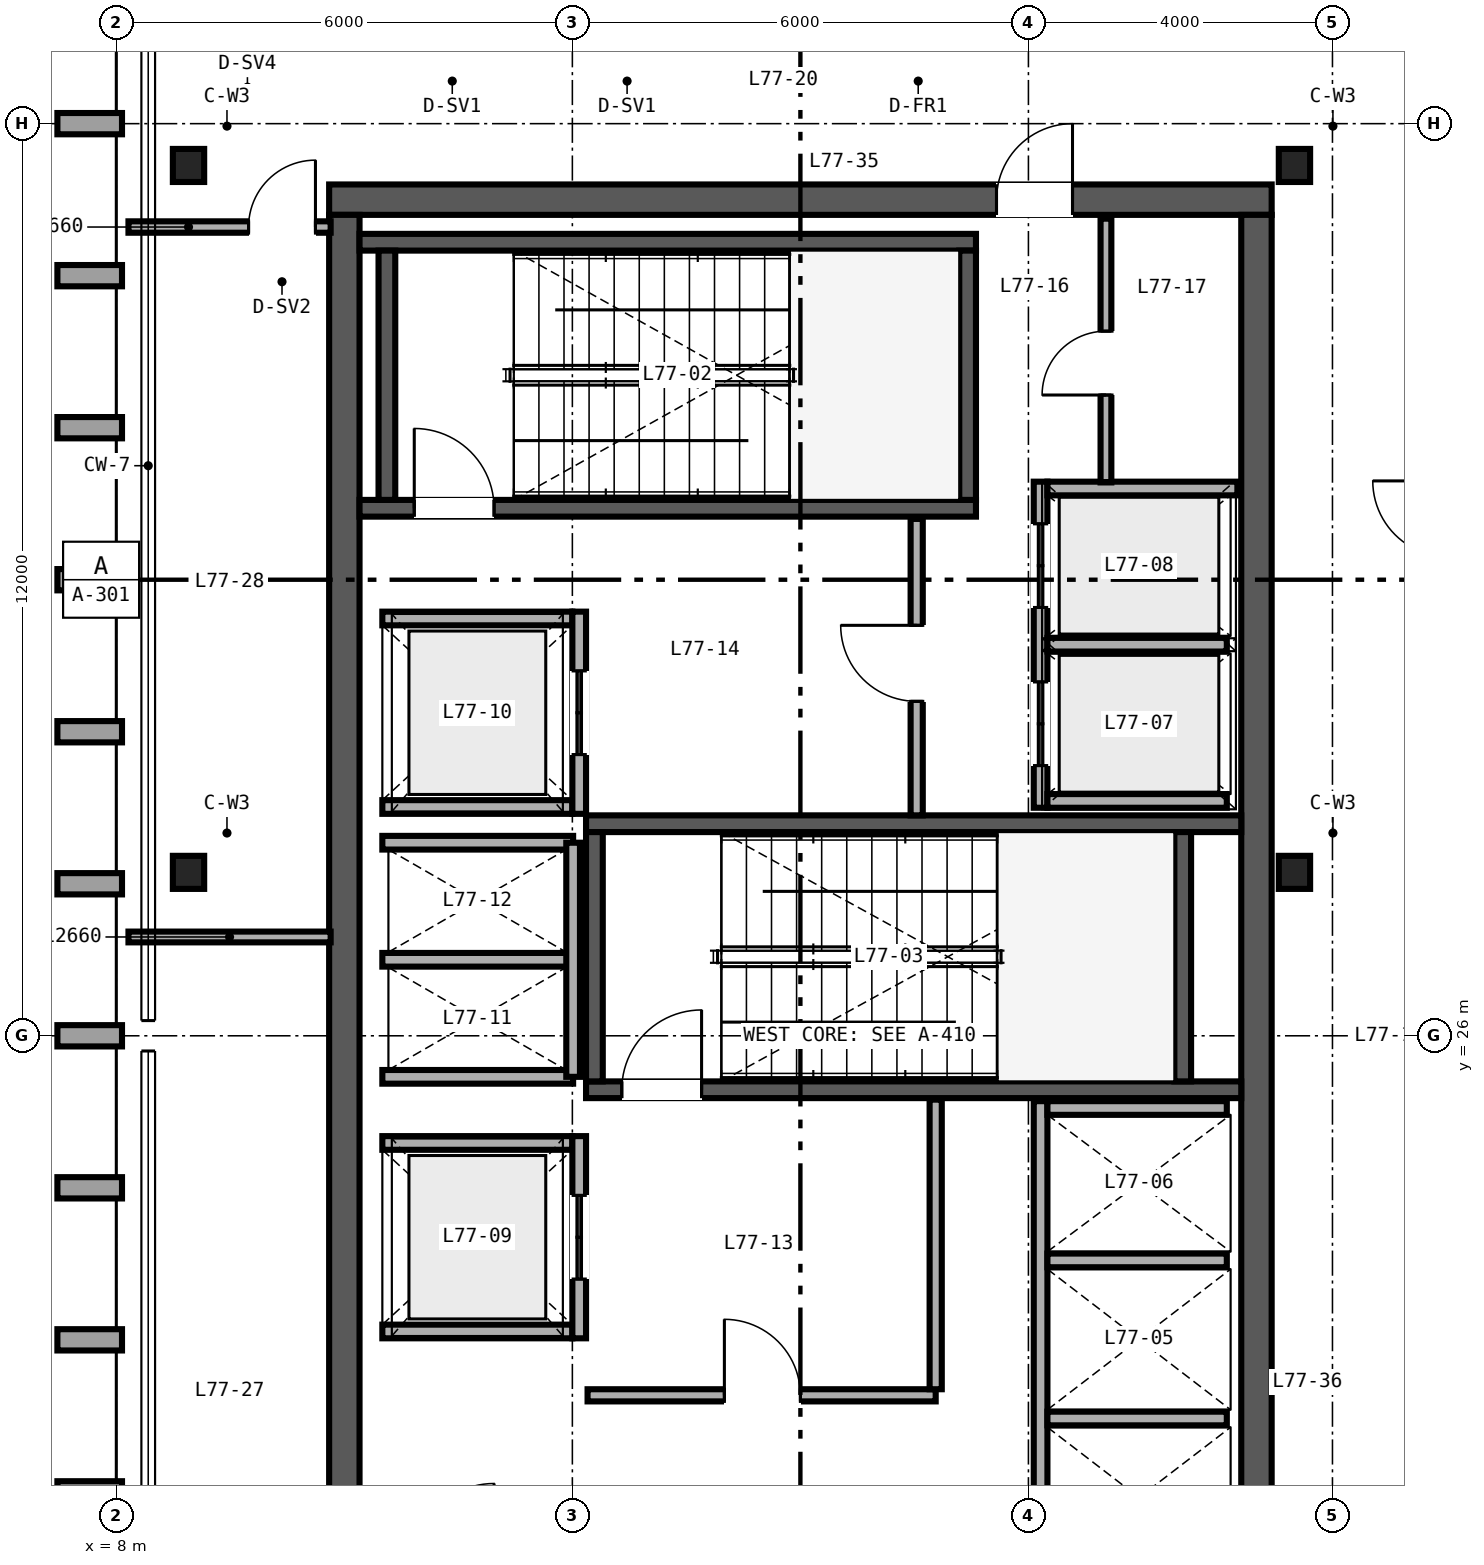
"""IFC4 building model, lengths in metres.
Left out: names, types, materials, properties, quantities, classifications, styles, units other than length and angle.
Written with IfcOpenShell. Run it as: python <this file> out.ifc"""

import sys

from ifc_helpers import new_model, si_unit, direction, frame, frame_2d, origin, origin_2d, place, context, subcontext, project, spatial, rectangle, i_section, extrude, source, transform, mapped, element, fill, save


model = new_model("IFC4")
c1 = context("Model", 3, precision=1e-05, world=origin(), true_north=direction((0.0, 1.0)))
c2 = subcontext(c1, "Body", "Model", "MODEL_VIEW")
j1 = project(units=[si_unit("LENGTHUNIT", "METRE"), si_unit("PLANEANGLEUNIT", "RADIAN")], contexts=[c1])
p1 = place(None, origin())
s1 = spatial("IfcSite", under=j1, at=p1, CompositionType="ELEMENT")
p2 = place(p1, origin())
s2 = spatial("IfcBuilding", under=s1, at=p2, CompositionType="ELEMENT")
p3 = place(p2, frame((0.0, 0.0, 301.2)))
s3 = spatial("IfcBuildingStorey", under=s2, at=p3, CompositionType="ELEMENT", Elevation=301.2)
p4 = place(p3, frame((10.8, 37.0, 0.0), z_axis=(0.0, 0.0, 1.0), x_axis=(1.0, 0.0, 0.0)))
e1 = element("IfcWall", 1, at=p4, inside=s3, PredefinedType="SHEAR", context=c2, shape_type="SweptSolid", body=[
    extrude(rectangle(XDim=12.4, YDim=0.4, at=frame_2d((6.2, 0.0))), origin(), (0.0, 0.0, 1.0), 3.92),
])
p5 = place(p4, frame((8.78, 0.0, 0.0)))
e2 = element("IfcOpeningElement", 2, at=p5, cuts=e1, PredefinedType="OPENING", context=c2, shape_type="SweptSolid", body=[
    extrude(rectangle(XDim=1.0, YDim=2.15, at=frame_2d((0.5, 1.075))), frame((0.0, 0.21, 0.0), z_axis=(0.0, -1.0, 0.0), x_axis=(1.0, 0.0, 0.0)), (0.0, 0.0, 1.0), 0.42),
])
for number, where, z_axis, x_axis in (
    (3, (11.0, 15.2, 0.0), (0.0, 0.0, 1.0), (0.0, 1.0, 0.0)),
    (4, (23.0, 15.2, 0.0), (0.0, 0.0, 1.0), (0.0, 1.0, 0.0)),
):
    element("IfcWall", number, at=place(p3, frame(where, z_axis=z_axis, x_axis=x_axis)), inside=s3, PredefinedType="SHEAR", context=c2, shape_type="SweptSolid", body=[
        extrude(rectangle(XDim=21.6, YDim=0.4, at=frame_2d((10.8, 0.0))), origin(), (0.0, 0.0, 1.0), 3.92),
    ])
p6 = place(p3, frame((11.2, 32.94, 0.0), z_axis=(0.0, 0.0, 1.0), x_axis=(1.0, 0.0, 0.0)))
e5 = element("IfcWall", 5, at=p6, inside=s3, PredefinedType="SHEAR", context=c2, shape_type="SweptSolid", body=[
    extrude(rectangle(XDim=8.11, YDim=0.22, at=frame_2d((4.055, 0.0))), origin(), (0.0, 0.0, 1.0), 4.0),
])
p7 = place(p6, frame((0.72, 0.0, 0.0)))
e6 = element("IfcOpeningElement", 6, at=p7, cuts=e5, PredefinedType="OPENING", context=c2, shape_type="SweptSolid", body=[
    extrude(rectangle(XDim=1.05, YDim=2.15, at=frame_2d((0.525, 1.075))), frame((0.0, 0.12, 0.0), z_axis=(0.0, -1.0, 0.0), x_axis=(1.0, 0.0, 0.0)), (0.0, 0.0, 1.0), 0.24),
])
p8 = place(p3, frame((11.2, 36.44, 0.0), z_axis=(0.0, 0.0, 1.0), x_axis=(1.0, 0.0, 0.0)))
e7 = element("IfcWall", 7, at=p8, inside=s3, PredefinedType="SHEAR", context=c2, shape_type="SweptSolid", body=[
    extrude(rectangle(XDim=8.11, YDim=0.22, at=frame_2d((4.055, 0.0))), origin(), (0.0, 0.0, 1.0), 4.0),
])
for number, where, z_axis, x_axis in (
    (8, (11.56, 33.05, 0.0), (0.0, 0.0, 1.0), (0.0, 1.0, 0.0)),
    (9, (19.2, 33.05, 0.0), (0.0, 0.0, 1.0), (0.0, 1.0, 0.0)),
):
    element("IfcWall", number, at=place(p3, frame(where, z_axis=z_axis, x_axis=x_axis)), inside=s3, PredefinedType="SHEAR", context=c2, shape_type="SweptSolid", body=[
        extrude(rectangle(XDim=3.28, YDim=0.22, at=frame_2d((1.64, 0.0))), origin(), (0.0, 0.0, 1.0), 4.0),
    ])
p9 = place(p3, frame((14.18, 25.29, 0.0), z_axis=(0.0, 0.0, 1.0), x_axis=(1.0, 0.0, 0.0)))
e10 = element("IfcWall", 10, at=p9, inside=s3, PredefinedType="SHEAR", context=c2, shape_type="SweptSolid", body=[
    extrude(rectangle(XDim=8.62, YDim=0.22, at=frame_2d((4.31, 0.0))), origin(), (0.0, 0.0, 1.0), 4.0),
])
p10 = place(p9, frame((0.47, 0.0, 0.0)))
e11 = element("IfcOpeningElement", 11, at=p10, cuts=e10, PredefinedType="OPENING", context=c2, shape_type="SweptSolid", body=[
    extrude(rectangle(XDim=1.05, YDim=2.15, at=frame_2d((0.525, 1.075))), frame((0.0, 0.12, 0.0), z_axis=(0.0, -1.0, 0.0), x_axis=(1.0, 0.0, 0.0)), (0.0, 0.0, 1.0), 0.24),
])
p11 = place(p3, frame((14.18, 28.79, 0.0), z_axis=(0.0, 0.0, 1.0), x_axis=(1.0, 0.0, 0.0)))
e12 = element("IfcWall", 12, at=p11, inside=s3, PredefinedType="SHEAR", context=c2, shape_type="SweptSolid", body=[
    extrude(rectangle(XDim=8.62, YDim=0.22, at=frame_2d((4.31, 0.0))), origin(), (0.0, 0.0, 1.0), 4.0),
])
for number, where, z_axis, x_axis in (
    (13, (14.29, 25.4, 0.0), (0.0, 0.0, 1.0), (0.0, 1.0, 0.0)),
    (14, (22.03, 25.4, 0.0), (0.0, 0.0, 1.0), (0.0, 1.0, 0.0)),
):
    element("IfcWall", number, at=place(p3, frame(where, z_axis=z_axis, x_axis=x_axis)), inside=s3, PredefinedType="SHEAR", context=c2, shape_type="SweptSolid", body=[
        extrude(rectangle(XDim=3.28, YDim=0.22, at=frame_2d((1.64, 0.0))), origin(), (0.0, 0.0, 1.0), 4.0),
    ])
m1 = source(origin(), c2, "Body", "SweptSolid", [
    extrude(i_section(OverallWidth=0.412, OverallDepth=0.435, WebThickness=0.036, FlangeThickness=0.057, FilletRadius=0.025, at=origin_2d()), origin(), (0.0, 0.0, 1.0), 3.92),
])
for number, where, z_axis, x_axis in (
    (15, (8.95, 28.15, 0.0), (0.0, 0.0, 1.0), (1.0, 0.0, 0.0)),
    (16, (23.5, 28.15, 0.0), (0.0, 0.0, 1.0), (1.0, 0.0, 0.0)),
    (17, (8.95, 37.45, 0.0), (0.0, 0.0, 1.0), (1.0, 0.0, 0.0)),
    (18, (23.5, 37.45, 0.0), (0.0, 0.0, 1.0), (1.0, 0.0, 0.0)),
):
    element("IfcColumn", number, at=place(p3, frame(where, z_axis=z_axis, x_axis=x_axis)), inside=s3, PredefinedType="COLUMN", context=c2, shape_type="MappedRepresentation", body=[
        mapped(m1, transform((0.0, 0.0, 0.0), scale=1.0)),
    ])
p12 = place(p3, frame((20.16, 18.82, 0.0), z_axis=(0.0, 0.0, 1.0), x_axis=(0.0, 1.0, 0.0)))
e19 = element("IfcWall", 19, at=p12, inside=s3, PredefinedType="SOLIDWALL", context=c2, shape_type="SweptSolid", body=[
    extrude(rectangle(XDim=6.32, YDim=0.18, at=frame_2d((3.16, 0.0))), origin(), (0.0, 0.0, 1.0), 3.02),
])
p13 = place(p3, frame((20.25, 25.05, 0.0), z_axis=(0.0, 0.0, 1.0), x_axis=(1.0, 0.0, 0.0)))
e20 = element("IfcWall", 20, at=p13, inside=s3, PredefinedType="SOLIDWALL", context=c2, shape_type="SweptSolid", body=[
    extrude(rectangle(XDim=2.36, YDim=0.18, at=frame_2d((1.18, 0.0))), origin(), (0.0, 0.0, 1.0), 3.92),
])
p14 = place(p3, frame((20.25, 20.965, 0.0), z_axis=(0.0, 0.0, 1.0), x_axis=(1.0, 0.0, 0.0)))
e21 = element("IfcWall", 21, at=p14, inside=s3, PredefinedType="SOLIDWALL", context=c2, shape_type="SweptSolid", body=[
    extrude(rectangle(XDim=2.36, YDim=0.18, at=frame_2d((1.18, 0.0))), origin(), (0.0, 0.0, 1.0), 3.02),
])
p15 = place(p3, frame((20.25, 23.045, 0.0), z_axis=(0.0, 0.0, 1.0), x_axis=(1.0, 0.0, 0.0)))
e22 = element("IfcWall", 22, at=p15, inside=s3, PredefinedType="SOLIDWALL", context=c2, shape_type="SweptSolid", body=[
    extrude(rectangle(XDim=2.36, YDim=0.18, at=frame_2d((1.18, 0.0))), origin(), (0.0, 0.0, 1.0), 3.92),
])
p16 = place(p3, frame((20.16, 29.0, 0.0), z_axis=(0.0, 0.0, 1.0), x_axis=(0.0, 1.0, 0.0)))
e23 = element("IfcWall", 23, at=p16, inside=s3, PredefinedType="SOLIDWALL", context=c2, shape_type="SweptSolid", body=[
    extrude(rectangle(XDim=4.29, YDim=0.18, at=frame_2d((2.145, 0.0))), origin(), (0.0, 0.0, 1.0), 3.92),
])
p17 = place(p16, frame((0.555, 0.0, 0.0)))
e24 = element("IfcOpeningElement", 24, at=p17, cuts=e23, PredefinedType="OPENING", context=c2, shape_type="SweptSolid", body=[
    extrude(rectangle(XDim=1.1, YDim=2.2, at=frame_2d((0.55, 1.1))), frame((0.0, 0.1, 0.0), z_axis=(0.0, -1.0, 0.0), x_axis=(1.0, 0.0, 0.0)), (0.0, 0.0, 1.0), 0.2),
])
p18 = place(p16, frame((2.635, 0.0, 0.0)))
e25 = element("IfcOpeningElement", 25, at=p18, cuts=e23, PredefinedType="OPENING", context=c2, shape_type="SweptSolid", body=[
    extrude(rectangle(XDim=1.1, YDim=2.2, at=frame_2d((0.55, 1.1))), frame((0.0, 0.1, 0.0), z_axis=(0.0, -1.0, 0.0), x_axis=(1.0, 0.0, 0.0)), (0.0, 0.0, 1.0), 0.2),
])
p19 = place(p3, frame((20.25, 29.09, 0.0), z_axis=(0.0, 0.0, 1.0), x_axis=(1.0, 0.0, 0.0)))
e26 = element("IfcWall", 26, at=p19, inside=s3, PredefinedType="SOLIDWALL", context=c2, shape_type="SweptSolid", body=[
    extrude(rectangle(XDim=2.36, YDim=0.18, at=frame_2d((1.18, 0.0))), origin(), (0.0, 0.0, 1.0), 3.92),
])
p20 = place(p3, frame((20.25, 33.2, 0.0), z_axis=(0.0, 0.0, 1.0), x_axis=(1.0, 0.0, 0.0)))
e27 = element("IfcWall", 27, at=p20, inside=s3, PredefinedType="SOLIDWALL", context=c2, shape_type="SweptSolid", body=[
    extrude(rectangle(XDim=2.5, YDim=0.18, at=frame_2d((1.25, 0.0))), origin(), (0.0, 0.0, 1.0), 3.92),
])
p21 = place(p3, frame((20.25, 31.145, 0.0), z_axis=(0.0, 0.0, 1.0), x_axis=(1.0, 0.0, 0.0)))
e28 = element("IfcWall", 28, at=p21, inside=s3, PredefinedType="SOLIDWALL", context=c2, shape_type="SweptSolid", body=[
    extrude(rectangle(XDim=2.36, YDim=0.18, at=frame_2d((1.18, 0.0))), origin(), (0.0, 0.0, 1.0), 3.92),
])
for number, where, z_axis, x_axis in (
    (29, (11.5, 22.11, 0.0), (0.0, 0.0, 1.0), (1.0, 0.0, 0.0)),
    (30, (11.5, 24.59, 0.0), (0.0, 0.0, 1.0), (1.0, 0.0, 0.0)),
):
    element("IfcWall", number, at=place(p3, frame(where, z_axis=z_axis, x_axis=x_axis)), inside=s3, PredefinedType="SOLIDWALL", context=c2, shape_type="SweptSolid", body=[
        extrude(rectangle(XDim=2.5, YDim=0.18, at=frame_2d((1.25, 0.0))), origin(), (0.0, 0.0, 1.0), 3.92),
    ])
p22 = place(p3, frame((14.09, 22.02, 0.0), z_axis=(0.0, 0.0, 1.0), x_axis=(0.0, 1.0, 0.0)))
e31 = element("IfcWall", 31, at=p22, inside=s3, PredefinedType="SOLIDWALL", context=c2, shape_type="SweptSolid", body=[
    extrude(rectangle(XDim=2.66, YDim=0.18, at=frame_2d((1.33, 0.0))), origin(), (0.0, 0.0, 1.0), 3.92),
])
p23 = place(p22, frame((0.78, 0.0, 0.0)))
e32 = element("IfcOpeningElement", 32, at=p23, cuts=e31, PredefinedType="OPENING", context=c2, shape_type="SweptSolid", body=[
    extrude(rectangle(XDim=1.1, YDim=2.2, at=frame_2d((0.55, 1.1))), frame((0.0, 0.1, 0.0), z_axis=(0.0, -1.0, 0.0), x_axis=(1.0, 0.0, 0.0)), (0.0, 0.0, 1.0), 0.2),
])
for number, where, z_axis, x_axis in (
    (33, (11.5, 29.01, 0.0), (0.0, 0.0, 1.0), (1.0, 0.0, 0.0)),
    (34, (11.5, 31.49, 0.0), (0.0, 0.0, 1.0), (1.0, 0.0, 0.0)),
):
    element("IfcWall", number, at=place(p3, frame(where, z_axis=z_axis, x_axis=x_axis)), inside=s3, PredefinedType="SOLIDWALL", context=c2, shape_type="SweptSolid", body=[
        extrude(rectangle(XDim=2.5, YDim=0.18, at=frame_2d((1.25, 0.0))), origin(), (0.0, 0.0, 1.0), 3.92),
    ])
p24 = place(p3, frame((14.09, 28.92, 0.0), z_axis=(0.0, 0.0, 1.0), x_axis=(0.0, 1.0, 0.0)))
e35 = element("IfcWall", 35, at=p24, inside=s3, PredefinedType="SOLIDWALL", context=c2, shape_type="SweptSolid", body=[
    extrude(rectangle(XDim=2.66, YDim=0.18, at=frame_2d((1.33, 0.0))), origin(), (0.0, 0.0, 1.0), 3.92),
])
p25 = place(p24, frame((0.78, 0.0, 0.0)))
e36 = element("IfcOpeningElement", 36, at=p25, cuts=e35, PredefinedType="OPENING", context=c2, shape_type="SweptSolid", body=[
    extrude(rectangle(XDim=1.1, YDim=2.2, at=frame_2d((0.55, 1.1))), frame((0.0, 0.1, 0.0), z_axis=(0.0, -1.0, 0.0), x_axis=(1.0, 0.0, 0.0)), (0.0, 0.0, 1.0), 0.2),
])
for number, where, z_axis, x_axis in (
    (37, (11.5, 25.46, 0.0), (0.0, 0.0, 1.0), (1.0, 0.0, 0.0)),
    (38, (11.5, 27.0, 0.0), (0.0, 0.0, 1.0), (1.0, 0.0, 0.0)),
    (39, (11.5, 28.54, 0.0), (0.0, 0.0, 1.0), (1.0, 0.0, 0.0)),
):
    element("IfcWall", number, at=place(p3, frame(where, z_axis=z_axis, x_axis=x_axis)), inside=s3, PredefinedType="SOLIDWALL", context=c2, shape_type="SweptSolid", body=[
        extrude(rectangle(XDim=2.51, YDim=0.18, at=frame_2d((1.255, 0.0))), origin(), (0.0, 0.0, 1.0), 3.92),
    ])
p26 = place(p3, frame((14.01, 25.46, 0.0), z_axis=(0.0, 0.0, 1.0), x_axis=(0.0, 1.0, 0.0)))
e40 = element("IfcWall", 40, at=p26, inside=s3, PredefinedType="SOLIDWALL", context=c2, shape_type="SweptSolid", body=[
    extrude(rectangle(XDim=3.08, YDim=0.18, at=frame_2d((1.54, 0.0))), origin(), (0.0, 0.0, 1.0), 3.92),
])
p27 = place(p3, frame((14.2, 21.27, 0.0), z_axis=(0.0, 0.0, 1.0), x_axis=(1.0, 0.0, 0.0)))
e41 = element("IfcWall", 41, at=p27, inside=s3, PredefinedType="PARTITIONING", context=c2, shape_type="SweptSolid", body=[
    extrude(rectangle(XDim=4.58, YDim=0.16, at=frame_2d((2.29, 0.0))), origin(), (0.0, 0.0, 1.0), 3.92),
])
p28 = place(p27, frame((1.8, 0.0, 0.0)))
e42 = element("IfcOpeningElement", 42, at=p28, cuts=e41, PredefinedType="OPENING", context=c2, shape_type="SweptSolid", body=[
    extrude(rectangle(XDim=1.0, YDim=2.15, at=frame_2d((0.5, 1.075))), frame((0.0, 0.09, 0.0), z_axis=(0.0, -1.0, 0.0), x_axis=(1.0, 0.0, 0.0)), (0.0, 0.0, 1.0), 0.18),
])
p29 = place(p3, frame((18.78, 21.35, 0.0), z_axis=(0.0, 0.0, 1.0), x_axis=(0.0, 1.0, 0.0)))
e43 = element("IfcWall", 43, at=p29, inside=s3, PredefinedType="PARTITIONING", context=c2, shape_type="SweptSolid", body=[
    extrude(rectangle(XDim=3.81, YDim=0.16, at=frame_2d((1.905, 0.0))), origin(), (0.0, 0.0, 1.0), 3.92),
])
p30 = place(p3, frame((18.53, 28.9, 0.0), z_axis=(0.0, 0.0, 1.0), x_axis=(0.0, 1.0, 0.0)))
e44 = element("IfcWall", 44, at=p30, inside=s3, PredefinedType="PARTITIONING", context=c2, shape_type="SweptSolid", body=[
    extrude(rectangle(XDim=3.9, YDim=0.16, at=frame_2d((1.95, 0.0))), origin(), (0.0, 0.0, 1.0), 3.92),
])
p31 = place(p30, frame((1.5, 0.0, 0.0)))
e45 = element("IfcOpeningElement", 45, at=p31, cuts=e44, PredefinedType="OPENING", context=c2, shape_type="SweptSolid", body=[
    extrude(rectangle(XDim=1.0, YDim=2.15, at=frame_2d((0.5, 1.075))), frame((0.0, 0.09, 0.0), z_axis=(0.0, -1.0, 0.0), x_axis=(1.0, 0.0, 0.0)), (0.0, 0.0, 1.0), 0.18),
])
p32 = place(p3, frame((21.02, 33.28, 0.0), z_axis=(0.0, 0.0, 1.0), x_axis=(0.0, 1.0, 0.0)))
e46 = element("IfcWall", 46, at=p32, inside=s3, PredefinedType="PARTITIONING", context=c2, shape_type="SweptSolid", body=[
    extrude(rectangle(XDim=3.47, YDim=0.142, at=frame_2d((1.735, 0.0))), origin(), (0.0, 0.0, 1.0), 3.92),
])
p33 = place(p32, frame((1.15, 0.0, 0.0)))
e47 = element("IfcOpeningElement", 47, at=p33, cuts=e46, PredefinedType="OPENING", context=c2, shape_type="SweptSolid", body=[
    extrude(rectangle(XDim=0.84, YDim=2.1, at=frame_2d((0.42, 1.05))), frame((0.0, 0.081, 0.0), z_axis=(0.0, -1.0, 0.0), x_axis=(1.0, 0.0, 0.0)), (0.0, 0.0, 1.0), 0.162),
])
p34 = place(p3, frame((8.16, 36.64, 0.0), z_axis=(0.0, 0.0, 1.0), x_axis=(1.0, 0.0, 0.0)))
e48 = element("IfcWall", 48, at=p34, inside=s3, PredefinedType="PARTITIONING", context=c2, shape_type="SweptSolid", body=[
    extrude(rectangle(XDim=2.66, YDim=0.15, at=frame_2d((1.33, 0.0))), origin(), (0.0, 0.0, 1.0), 3.303),
])
p35 = place(p34, frame((1.58, 0.0, 0.0)))
e49 = element("IfcOpeningElement", 49, at=p35, cuts=e48, PredefinedType="OPENING", context=c2, shape_type="SweptSolid", body=[
    extrude(rectangle(XDim=0.88, YDim=2.15, at=frame_2d((0.44, 1.075))), frame((0.0, 0.085, 0.0), z_axis=(0.0, -1.0, 0.0), x_axis=(1.0, 0.0, 0.0)), (0.0, 0.0, 1.0), 0.17),
])
p36 = place(p3, frame((8.16, 27.3, 0.0), z_axis=(0.0, 0.0, 1.0), x_axis=(1.0, 0.0, 0.0)))
e50 = element("IfcWall", 50, at=p36, inside=s3, PredefinedType="PARTITIONING", context=c2, shape_type="SweptSolid", body=[
    extrude(rectangle(XDim=2.66, YDim=0.142, at=frame_2d((1.33, 0.0))), origin(), (0.0, 0.0, 1.0), 3.141),
])
m2 = source(origin(), c2, "Body", "SweptSolid", [
    extrude(rectangle(XDim=1.05, YDim=2.15, at=frame_2d((0.525, 1.075))), frame((0.0, 0.025, 0.0), z_axis=(0.0, -1.0, 0.0), x_axis=(1.0, 0.0, 0.0)), (0.0, 0.0, 1.0), 0.05),
])
p37 = place(p7, origin())
e51 = element("IfcDoor", 51, at=p37, inside=s3, OperationType="SINGLE_SWING_LEFT", PredefinedType="DOOR", context=c2, shape_type="MappedRepresentation", body=[
    mapped(m2, transform((0.0, 0.0, 0.0), scale=1.0)),
])
fill(e6, e51)
p38 = place(p10, origin())
e52 = element("IfcDoor", 52, at=p38, inside=s3, OperationType="SINGLE_SWING_RIGHT", PredefinedType="DOOR", context=c2, shape_type="MappedRepresentation", body=[
    mapped(m2, transform((0.0, 0.0, 0.0), scale=1.0)),
])
fill(e11, e52)
m3 = source(origin(), c2, "Body", "SweptSolid", [
    extrude(rectangle(XDim=1.1, YDim=2.2, at=frame_2d((0.55, 1.1))), frame((0.0, 0.025, 0.0), z_axis=(0.0, -1.0, 0.0), x_axis=(1.0, 0.0, 0.0)), (0.0, 0.0, 1.0), 0.05),
])
p39 = place(p17, origin())
e53 = element("IfcDoor", 53, at=p39, inside=s3, OperationType="DOUBLE_DOOR_SLIDING", PredefinedType="DOOR", context=c2, shape_type="MappedRepresentation", body=[
    mapped(m3, transform((0.0, 0.0, 0.0), scale=1.0)),
])
fill(e24, e53)
p40 = place(p18, origin())
e54 = element("IfcDoor", 54, at=p40, inside=s3, OperationType="DOUBLE_DOOR_SLIDING", PredefinedType="DOOR", context=c2, shape_type="MappedRepresentation", body=[
    mapped(m3, transform((0.0, 0.0, 0.0), scale=1.0)),
])
fill(e25, e54)
p41 = place(p23, origin())
e55 = element("IfcDoor", 55, at=p41, inside=s3, OperationType="DOUBLE_DOOR_SLIDING", PredefinedType="DOOR", context=c2, shape_type="MappedRepresentation", body=[
    mapped(m3, transform((0.0, 0.0, 0.0), scale=1.0)),
])
fill(e32, e55)
p42 = place(p25, origin())
e56 = element("IfcDoor", 56, at=p42, inside=s3, OperationType="DOUBLE_DOOR_SLIDING", PredefinedType="DOOR", context=c2, shape_type="MappedRepresentation", body=[
    mapped(m3, transform((0.0, 0.0, 0.0), scale=1.0)),
])
fill(e36, e56)
m4 = source(origin(), c2, "Body", "SweptSolid", [
    extrude(rectangle(XDim=1.0, YDim=2.15, at=frame_2d((0.5, 1.075))), frame((0.0, 0.025, 0.0), z_axis=(0.0, -1.0, 0.0), x_axis=(1.0, 0.0, 0.0)), (0.0, 0.0, 1.0), 0.05),
])
p43 = place(p28, origin())
e57 = element("IfcDoor", 57, at=p43, inside=s3, OperationType="SINGLE_SWING_LEFT", PredefinedType="DOOR", context=c2, shape_type="MappedRepresentation", body=[
    mapped(m4, transform((0.0, 0.0, 0.0), scale=1.0)),
])
fill(e42, e57)
p44 = place(p31, origin())
e58 = element("IfcDoor", 58, at=p44, inside=s3, OperationType="SINGLE_SWING_RIGHT", PredefinedType="DOOR", context=c2, shape_type="MappedRepresentation", body=[
    mapped(m4, transform((0.0, 0.0, 0.0), scale=1.0)),
])
fill(e45, e58)
m5 = source(origin(), c2, "Body", "SweptSolid", [
    extrude(rectangle(XDim=0.84, YDim=2.1, at=frame_2d((0.42, 1.05))), frame((0.0, 0.025, 0.0), z_axis=(0.0, -1.0, 0.0), x_axis=(1.0, 0.0, 0.0)), (0.0, 0.0, 1.0), 0.05),
])
p45 = place(p33, origin())
e59 = element("IfcDoor", 59, at=p45, inside=s3, OperationType="SINGLE_SWING_LEFT", PredefinedType="DOOR", context=c2, shape_type="MappedRepresentation", body=[
    mapped(m5, transform((0.0, 0.0, 0.0), scale=1.0)),
])
fill(e47, e59)
p46 = place(p5, origin())
e60 = element("IfcDoor", 60, at=p46, inside=s3, OperationType="SINGLE_SWING_RIGHT", PredefinedType="DOOR", context=c2, shape_type="MappedRepresentation", body=[
    mapped(m4, transform((0.0, 0.0, 0.0), scale=1.0)),
])
fill(e2, e60)
m6 = source(origin(), c2, "Body", "SweptSolid", [
    extrude(rectangle(XDim=0.88, YDim=2.15, at=frame_2d((0.44, 1.075))), frame((0.0, 0.025, 0.0), z_axis=(0.0, -1.0, 0.0), x_axis=(1.0, 0.0, 0.0)), (0.0, 0.0, 1.0), 0.05),
])
p47 = place(p35, origin())
e61 = element("IfcDoor", 61, at=p47, inside=s3, OperationType="SINGLE_SWING_RIGHT", PredefinedType="DOOR", context=c2, shape_type="MappedRepresentation", body=[
    mapped(m6, transform((0.0, 0.0, 0.0), scale=1.0)),
])
fill(e49, e61)
save(model, sys.argv[1])
